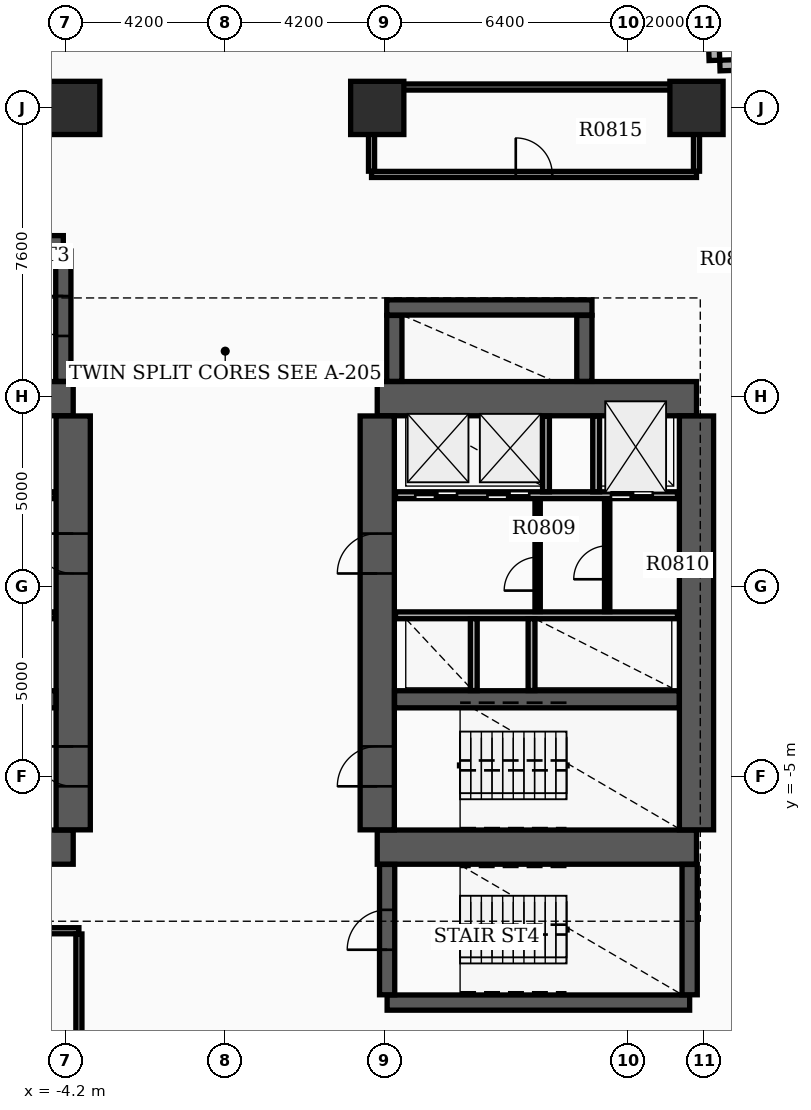
"""IFC4 building model, lengths in metres.
Left out: names, types, materials, properties, quantities, classifications, styles, units other than length and angle.
Written with IfcOpenShell. Run it as: python <this file> out.ifc"""

import sys

from ifc_helpers import new_model, si_unit, direction, frame, frame_2d, origin, origin_2d, place, context, subcontext, project, spatial, rectangle, extrude, element, fill, save


model = new_model("IFC4")
c1 = context("Model", 3, precision=1e-05, world=origin(), true_north=direction((0.0, 1.0)))
c2 = subcontext(c1, "Body", "Model", "MODEL_VIEW")
j1 = project(units=[si_unit("LENGTHUNIT", "METRE"), si_unit("PLANEANGLEUNIT", "RADIAN")], contexts=[c1])
p1 = place(None, origin())
s1 = spatial("IfcSite", under=j1, at=p1, CompositionType="ELEMENT")
p2 = place(p1, origin())
s2 = spatial("IfcBuilding", under=s1, at=p2, CompositionType="ELEMENT")
p3 = place(p2, frame((0.0, 0.0, 56.1)))
s3 = spatial("IfcBuildingStorey", under=s2, at=p3, CompositionType="ELEMENT", Elevation=56.1)
for number, where, z_axis, x_axis in (
    (1, (-12.4, -6.85, 0.0), (0.0, 0.0, 1.0), (1.0, 0.0, 0.0)),
    (2, (-12.4, 4.95, 0.0), (0.0, 0.0, 1.0), (1.0, 0.0, 0.0)),
):
    element("IfcWall", number, at=place(p3, frame(where, z_axis=z_axis, x_axis=x_axis)), inside=s3, PredefinedType="SHEAR", context=c2, shape_type="SweptSolid", body=[
        extrude(rectangle(XDim=8.4, YDim=0.9, at=frame_2d((4.2, 0.0))), origin(), (0.0, 0.0, 1.0), 3.7),
    ])
p4 = place(p3, frame((-4.0, -6.395, 0.0), z_axis=(0.0, 0.0, 1.0), x_axis=(0.0, 1.0, 0.0)))
e3 = element("IfcWall", 3, at=p4, inside=s3, PredefinedType="SHEAR", context=c2, shape_type="SweptSolid", body=[
    extrude(rectangle(XDim=10.89, YDim=0.9, at=frame_2d((5.445, 0.0))), origin(), (0.0, 0.0, 1.0), 3.7),
])
p5 = place(p4, frame((1.145, 0.0, 0.0)))
e4 = element("IfcOpeningElement", 4, at=p5, cuts=e3, PredefinedType="OPENING", context=c2, shape_type="SweptSolid", body=[
    extrude(rectangle(XDim=1.05, YDim=2.15, at=frame_2d((0.525, 1.075))), frame((0.0, 0.46, 0.0), z_axis=(0.0, -1.0, 0.0), x_axis=(1.0, 0.0, 0.0)), (0.0, 0.0, 1.0), 0.92),
])
p6 = place(p4, frame((6.745, 0.0, 0.0)))
e5 = element("IfcOpeningElement", 5, at=p6, cuts=e3, PredefinedType="OPENING", context=c2, shape_type="SweptSolid", body=[
    extrude(rectangle(XDim=1.05, YDim=2.15, at=frame_2d((0.525, 1.075))), frame((0.0, 0.46, 0.0), z_axis=(0.0, -1.0, 0.0), x_axis=(1.0, 0.0, 0.0)), (0.0, 0.0, 1.0), 0.92),
])
p7 = place(p3, frame((-11.945, -2.96, 0.0), z_axis=(0.0, 0.0, 1.0), x_axis=(1.0, 0.0, 0.0)))
e6 = element("IfcWall", 6, at=p7, inside=s3, PredefinedType="SHEAR", context=c2, shape_type="SweptSolid", body=[
    extrude(rectangle(XDim=7.49, YDim=0.45, at=frame_2d((3.745, 0.0))), origin(), (0.0, 0.0, 1.0), 3.7),
])
for number, where, z_axis, x_axis in (
    (7, (4.0, -6.85, 0.0), (0.0, 0.0, 1.0), (1.0, 0.0, 0.0)),
    (8, (4.0, 4.95, 0.0), (0.0, 0.0, 1.0), (1.0, 0.0, 0.0)),
):
    element("IfcWall", number, at=place(p3, frame(where, z_axis=z_axis, x_axis=x_axis)), inside=s3, PredefinedType="SHEAR", context=c2, shape_type="SweptSolid", body=[
        extrude(rectangle(XDim=8.4, YDim=0.9, at=frame_2d((4.2, 0.0))), origin(), (0.0, 0.0, 1.0), 3.7),
    ])
p8 = place(p3, frame((4.0, -6.395, 0.0), z_axis=(0.0, 0.0, 1.0), x_axis=(0.0, 1.0, 0.0)))
e9 = element("IfcWall", 9, at=p8, inside=s3, PredefinedType="SHEAR", context=c2, shape_type="SweptSolid", body=[
    extrude(rectangle(XDim=10.89, YDim=0.9, at=frame_2d((5.445, 0.0))), origin(), (0.0, 0.0, 1.0), 3.7),
])
p9 = place(p8, frame((1.145, 0.0, 0.0)))
e10 = element("IfcOpeningElement", 10, at=p9, cuts=e9, PredefinedType="OPENING", context=c2, shape_type="SweptSolid", body=[
    extrude(rectangle(XDim=1.05, YDim=2.15, at=frame_2d((0.525, 1.075))), frame((0.0, 0.46, 0.0), z_axis=(0.0, -1.0, 0.0), x_axis=(1.0, 0.0, 0.0)), (0.0, 0.0, 1.0), 0.92),
])
p10 = place(p8, frame((6.745, 0.0, 0.0)))
e11 = element("IfcOpeningElement", 11, at=p10, cuts=e9, PredefinedType="OPENING", context=c2, shape_type="SweptSolid", body=[
    extrude(rectangle(XDim=1.05, YDim=2.15, at=frame_2d((0.525, 1.075))), frame((0.0, 0.46, 0.0), z_axis=(0.0, -1.0, 0.0), x_axis=(1.0, 0.0, 0.0)), (0.0, 0.0, 1.0), 0.92),
])
p11 = place(p3, frame((12.4, -6.395, 0.0), z_axis=(0.0, 0.0, 1.0), x_axis=(0.0, 1.0, 0.0)))
e12 = element("IfcWall", 12, at=p11, inside=s3, PredefinedType="SHEAR", context=c2, shape_type="SweptSolid", body=[
    extrude(rectangle(XDim=10.89, YDim=0.9, at=frame_2d((5.445, 0.0))), origin(), (0.0, 0.0, 1.0), 3.7),
])
p12 = place(p3, frame((4.455, -2.96, 0.0), z_axis=(0.0, 0.0, 1.0), x_axis=(1.0, 0.0, 0.0)))
e13 = element("IfcWall", 13, at=p12, inside=s3, PredefinedType="SHEAR", context=c2, shape_type="SweptSolid", body=[
    extrude(rectangle(XDim=7.49, YDim=0.45, at=frame_2d((3.745, 0.0))), origin(), (0.0, 0.0, 1.0), 3.7),
])
p13 = place(p3, frame((-12.22, 9.04, 0.0), z_axis=(0.0, 0.0, 1.0), x_axis=(1.0, 0.0, 0.0)))
e14 = element("IfcWall", 14, at=p13, inside=s3, PredefinedType="SHEAR", context=c2, shape_type="SweptSolid", body=[
    extrude(rectangle(XDim=7.96, YDim=0.4, at=frame_2d((3.98, 0.0))), origin(), (0.0, 0.0, 1.0), 3.7),
])
p14 = place(p3, frame((-4.26, 5.405, 0.0), z_axis=(0.0, 0.0, 1.0), x_axis=(0.0, 1.0, 0.0)))
e15 = element("IfcWall", 15, at=p14, inside=s3, PredefinedType="SHEAR", context=c2, shape_type="SweptSolid", body=[
    extrude(rectangle(XDim=3.43, YDim=0.4, at=frame_2d((1.715, 0.0))), origin(), (0.0, 0.0, 1.0), 3.7),
])
p15 = place(p14, frame((1.195, 0.0, 0.0)))
e16 = element("IfcOpeningElement", 16, at=p15, cuts=e15, PredefinedType="OPENING", context=c2, shape_type="SweptSolid", body=[
    extrude(rectangle(XDim=1.05, YDim=2.15, at=frame_2d((0.525, 1.075))), frame((0.0, 0.21, 0.0), z_axis=(0.0, -1.0, 0.0), x_axis=(1.0, 0.0, 0.0)), (0.0, 0.0, 1.0), 0.42),
])
p16 = place(p3, frame((4.26, -10.94, 0.0), z_axis=(0.0, 0.0, 1.0), x_axis=(1.0, 0.0, 0.0)))
e17 = element("IfcWall", 17, at=p16, inside=s3, PredefinedType="SHEAR", context=c2, shape_type="SweptSolid", body=[
    extrude(rectangle(XDim=7.96, YDim=0.4, at=frame_2d((3.98, 0.0))), origin(), (0.0, 0.0, 1.0), 3.7),
])
p17 = place(p3, frame((4.26, -10.735, 0.0), z_axis=(0.0, 0.0, 1.0), x_axis=(0.0, 1.0, 0.0)))
e18 = element("IfcWall", 18, at=p17, inside=s3, PredefinedType="SHEAR", context=c2, shape_type="SweptSolid", body=[
    extrude(rectangle(XDim=3.43, YDim=0.4, at=frame_2d((1.715, 0.0))), origin(), (0.0, 0.0, 1.0), 3.7),
])
p18 = place(p17, frame((1.185, 0.0, 0.0)))
e19 = element("IfcOpeningElement", 19, at=p18, cuts=e18, PredefinedType="OPENING", context=c2, shape_type="SweptSolid", body=[
    extrude(rectangle(XDim=1.05, YDim=2.15, at=frame_2d((0.525, 1.075))), frame((0.0, 0.21, 0.0), z_axis=(0.0, -1.0, 0.0), x_axis=(1.0, 0.0, 0.0)), (0.0, 0.0, 1.0), 0.42),
])
p19 = place(p3, frame((12.22, -10.735, 0.0), z_axis=(0.0, 0.0, 1.0), x_axis=(0.0, 1.0, 0.0)))
e20 = element("IfcWall", 20, at=p19, inside=s3, PredefinedType="SHEAR", context=c2, shape_type="SweptSolid", body=[
    extrude(rectangle(XDim=3.43, YDim=0.4, at=frame_2d((1.715, 0.0))), origin(), (0.0, 0.0, 1.0), 3.7),
])
p20 = place(p3, frame((4.45, 5.405, 0.0), z_axis=(0.0, 0.0, 1.0), x_axis=(0.0, 1.0, 0.0)))
e21 = element("IfcWall", 21, at=p20, inside=s3, PredefinedType="SHEAR", context=c2, shape_type="SweptSolid", body=[
    extrude(rectangle(XDim=1.735, YDim=0.4, at=frame_2d((0.867, 0.0))), origin(), (0.0, 0.0, 1.0), 3.7),
])
p21 = place(p3, frame((4.25, 7.35, 0.0), z_axis=(0.0, 0.0, 1.0), x_axis=(1.0, 0.0, 0.0)))
e22 = element("IfcWall", 22, at=p21, inside=s3, PredefinedType="SHEAR", context=c2, shape_type="SweptSolid", body=[
    extrude(rectangle(XDim=5.4, YDim=0.4, at=frame_2d((2.7, 0.0))), origin(), (0.0, 0.0, 1.0), 3.7),
])
p22 = place(p3, frame((9.45, 5.405, 0.0), z_axis=(0.0, 0.0, 1.0), x_axis=(0.0, 1.0, 0.0)))
e23 = element("IfcWall", 23, at=p22, inside=s3, PredefinedType="SHEAR", context=c2, shape_type="SweptSolid", body=[
    extrude(rectangle(XDim=1.735, YDim=0.4, at=frame_2d((0.867, 0.0))), origin(), (0.0, 0.0, 1.0), 3.7),
])
for number, where, z_axis, x_axis in (
    (24, (12.4, 12.6, 0.0), (0.0, 0.0, 1.0), (1.0, 0.0, 0.0)),
    (25, (4.0, 12.6, 0.0), (0.0, 0.0, 1.0), (1.0, 0.0, 0.0)),
    (26, (-4.0, 12.6, 0.0), (0.0, 0.0, 1.0), (1.0, 0.0, 0.0)),
):
    element("IfcColumn", number, at=place(p3, frame(where, z_axis=z_axis, x_axis=x_axis)), inside=s3, PredefinedType="COLUMN", context=c2, shape_type="SweptSolid", body=[
        extrude(rectangle(XDim=1.4, YDim=1.4, at=origin_2d()), origin(), (0.0, 0.0, 1.0), 3.9),
    ])
p23 = place(p3, frame((14.235, 13.754, 0.0), z_axis=(0.0, 0.0, 1.0), x_axis=(-0.999506398264, -0.031415916822, 0.0)))
e27 = element("IfcWall", 27, at=p23, inside=s3, PredefinedType="STANDARD", context=c2, shape_type="SweptSolid", body=[
    extrude(rectangle(XDim=1.22, YDim=0.28, at=frame_2d((0.61, 0.0))), origin(), (0.0, 0.0, 1.0), 2.91),
])
p24 = place(p3, frame((12.871, 13.851, 0.0), z_axis=(0.0, 0.0, 1.0), x_axis=(-0.031412596484, 0.999506502621, 0.0)))
e28 = element("IfcWall", 28, at=p24, inside=s3, PredefinedType="STANDARD", context=c2, shape_type="SweptSolid", body=[
    extrude(rectangle(XDim=1.5, YDim=0.28, at=frame_2d((0.75, 0.0))), origin(), (0.0, 0.0, 1.0), 2.91),
])
p25 = place(p3, frame((-11.9, 2.41, 0.0), z_axis=(0.0, 0.0, 1.0), x_axis=(1.0, 0.0, 0.0)))
e29 = element("IfcWall", 29, at=p25, inside=s3, PredefinedType="SOLIDWALL", context=c2, shape_type="SweptSolid", body=[
    extrude(rectangle(XDim=7.42, YDim=0.18, at=frame_2d((3.71, 0.0))), origin(), (0.0, 0.0, 1.0), 2.9),
])
p26 = place(p25, frame((0.55, 0.0, 0.0)))
e30 = element("IfcOpeningElement", 30, at=p26, cuts=e29, PredefinedType="OPENING", context=c2, shape_type="SweptSolid", body=[
    extrude(rectangle(XDim=1.1, YDim=2.15, at=frame_2d((0.55, 1.075))), frame((0.0, 0.1, 0.0), z_axis=(0.0, -1.0, 0.0), x_axis=(1.0, 0.0, 0.0)), (0.0, 0.0, 1.0), 0.2),
])
p27 = place(p25, frame((3.85, 0.0, 0.0)))
e31 = element("IfcOpeningElement", 31, at=p27, cuts=e29, PredefinedType="OPENING", context=c2, shape_type="SweptSolid", body=[
    extrude(rectangle(XDim=1.1, YDim=2.15, at=frame_2d((0.55, 1.075))), frame((0.0, 0.1, 0.0), z_axis=(0.0, -1.0, 0.0), x_axis=(1.0, 0.0, 0.0)), (0.0, 0.0, 1.0), 0.2),
])
p28 = place(p25, frame((5.75, 0.0, 0.0)))
e32 = element("IfcOpeningElement", 32, at=p28, cuts=e29, PredefinedType="OPENING", context=c2, shape_type="SweptSolid", body=[
    extrude(rectangle(XDim=1.1, YDim=2.15, at=frame_2d((0.55, 1.075))), frame((0.0, 0.1, 0.0), z_axis=(0.0, -1.0, 0.0), x_axis=(1.0, 0.0, 0.0)), (0.0, 0.0, 1.0), 0.2),
])
p29 = place(p3, frame((4.48, 2.41, 0.0), z_axis=(0.0, 0.0, 1.0), x_axis=(1.0, 0.0, 0.0)))
e33 = element("IfcWall", 33, at=p29, inside=s3, PredefinedType="SOLIDWALL", context=c2, shape_type="SweptSolid", body=[
    extrude(rectangle(XDim=7.42, YDim=0.18, at=frame_2d((3.71, 0.0))), origin(), (0.0, 0.0, 1.0), 2.9),
])
p30 = place(p29, frame((5.67, 0.0, 0.0)))
e34 = element("IfcOpeningElement", 34, at=p30, cuts=e33, PredefinedType="OPENING", context=c2, shape_type="SweptSolid", body=[
    extrude(rectangle(XDim=1.1, YDim=2.15, at=frame_2d((0.55, 1.075))), frame((0.0, 0.1, 0.0), z_axis=(0.0, -1.0, 0.0), x_axis=(1.0, 0.0, 0.0)), (0.0, 0.0, 1.0), 0.2),
])
p31 = place(p29, frame((0.52, 0.0, 0.0)))
e35 = element("IfcOpeningElement", 35, at=p31, cuts=e33, PredefinedType="OPENING", context=c2, shape_type="SweptSolid", body=[
    extrude(rectangle(XDim=1.1, YDim=2.15, at=frame_2d((0.55, 1.075))), frame((0.0, 0.1, 0.0), z_axis=(0.0, -1.0, 0.0), x_axis=(1.0, 0.0, 0.0)), (0.0, 0.0, 1.0), 0.2),
])
p32 = place(p29, frame((2.42, 0.0, 0.0)))
e36 = element("IfcOpeningElement", 36, at=p32, cuts=e33, PredefinedType="OPENING", context=c2, shape_type="SweptSolid", body=[
    extrude(rectangle(XDim=1.1, YDim=2.15, at=frame_2d((0.55, 1.075))), frame((0.0, 0.1, 0.0), z_axis=(0.0, -1.0, 0.0), x_axis=(1.0, 0.0, 0.0)), (0.0, 0.0, 1.0), 0.2),
])
for number, where, z_axis, x_axis in (
    (37, (-11.9, -0.75, 0.0), (0.0, 0.0, 1.0), (1.0, 0.0, 0.0)),
    (38, (4.48, -0.75, 0.0), (0.0, 0.0, 1.0), (1.0, 0.0, 0.0)),
):
    element("IfcWall", number, at=place(p3, frame(where, z_axis=z_axis, x_axis=x_axis)), inside=s3, PredefinedType="SOLIDWALL", context=c2, shape_type="SweptSolid", body=[
        extrude(rectangle(XDim=7.42, YDim=0.18, at=frame_2d((3.71, 0.0))), origin(), (0.0, 0.0, 1.0), 2.9),
    ])
for number, where, z_axis, x_axis in (
    (39, (8.44, 2.5, 0.0), (0.0, 0.0, 1.0), (0.0, 1.0, 0.0)),
    (40, (9.76, 2.5, 0.0), (0.0, 0.0, 1.0), (0.0, 1.0, 0.0)),
):
    element("IfcWall", number, at=place(p3, frame(where, z_axis=z_axis, x_axis=x_axis)), inside=s3, PredefinedType="SOLIDWALL", context=c2, shape_type="SweptSolid", body=[
        extrude(rectangle(XDim=1.99, YDim=0.18, at=frame_2d((0.995, 0.0))), origin(), (0.0, 0.0, 1.0), 2.9),
    ])
for number, where, z_axis, x_axis in (
    (41, (6.54, -2.73, 0.0), (0.0, 0.0, 1.0), (0.0, 1.0, 0.0)),
    (42, (8.06, -2.73, 0.0), (0.0, 0.0, 1.0), (0.0, 1.0, 0.0)),
):
    element("IfcWall", number, at=place(p3, frame(where, z_axis=z_axis, x_axis=x_axis)), inside=s3, PredefinedType="SOLIDWALL", context=c2, shape_type="SweptSolid", body=[
        extrude(rectangle(XDim=1.89, YDim=0.18, at=frame_2d((0.945, 0.0))), origin(), (0.0, 0.0, 1.0), 2.9),
    ])
p33 = place(p3, frame((8.22, -0.65, 0.0), z_axis=(0.0, 0.0, 1.0), x_axis=(0.0, 1.0, 0.0)))
e43 = element("IfcWall", 43, at=p33, inside=s3, PredefinedType="SOLIDWALL", context=c2, shape_type="SweptSolid", body=[
    extrude(rectangle(XDim=2.96, YDim=0.14, at=frame_2d((1.48, 0.0))), origin(), (0.0, 0.0, 1.0), 2.9),
])
p34 = place(p33, frame((0.55, 0.0, 0.0)))
e44 = element("IfcOpeningElement", 44, at=p34, cuts=e43, PredefinedType="OPENING", context=c2, shape_type="SweptSolid", body=[
    extrude(rectangle(XDim=0.88, YDim=2.1, at=frame_2d((0.44, 1.05))), frame((0.0, 0.08, 0.0), z_axis=(0.0, -1.0, 0.0), x_axis=(1.0, 0.0, 0.0)), (0.0, 0.0, 1.0), 0.16),
])
p35 = place(p3, frame((10.05, -0.652, 0.0), z_axis=(0.0, 0.0, 1.0), x_axis=(0.0, 1.0, 0.0)))
e45 = element("IfcWall", 45, at=p35, inside=s3, PredefinedType="PARTITIONING", context=c2, shape_type="SweptSolid", body=[
    extrude(rectangle(XDim=2.962, YDim=0.14, at=frame_2d((1.481, 0.0))), origin(), (0.0, 0.0, 1.0), 2.9),
])
p36 = place(p35, frame((0.85, 0.0, 0.0)))
e46 = element("IfcOpeningElement", 46, at=p36, cuts=e45, PredefinedType="OPENING", context=c2, shape_type="SweptSolid", body=[
    extrude(rectangle(XDim=0.88, YDim=2.1, at=frame_2d((0.44, 1.05))), frame((0.0, 0.08, 0.0), z_axis=(0.0, -1.0, 0.0), x_axis=(1.0, 0.0, 0.0)), (0.0, 0.0, 1.0), 0.16),
])
p37 = place(p3, frame((3.85, 10.85, 0.0), z_axis=(0.0, 0.0, 1.0), x_axis=(1.0, 0.0, 0.0)))
e47 = element("IfcWall", 47, at=p37, inside=s3, PredefinedType="PARTITIONING", context=c2, shape_type="SweptSolid", body=[
    extrude(rectangle(XDim=8.55, YDim=0.16, at=frame_2d((4.275, 0.0))), origin(), (0.0, 0.0, 1.0), 2.9),
])
p38 = place(p37, frame((3.795, 0.0, 0.0)))
e48 = element("IfcOpeningElement", 48, at=p38, cuts=e47, PredefinedType="OPENING", context=c2, shape_type="SweptSolid", body=[
    extrude(rectangle(XDim=0.96, YDim=2.15, at=frame_2d((0.48, 1.075))), frame((0.0, 0.09, 0.0), z_axis=(0.0, -1.0, 0.0), x_axis=(1.0, 0.0, 0.0)), (0.0, 0.0, 1.0), 0.18),
])
p39 = place(p3, frame((3.85, 13.15, 0.0), z_axis=(0.0, 0.0, 1.0), x_axis=(1.0, 0.0, 0.0)))
e49 = element("IfcWall", 49, at=p39, inside=s3, PredefinedType="PARTITIONING", context=c2, shape_type="SweptSolid", body=[
    extrude(rectangle(XDim=8.55, YDim=0.16, at=frame_2d((4.275, 0.0))), origin(), (0.0, 0.0, 1.0), 2.9),
])
for number, where, z_axis, x_axis in (
    (50, (3.85, 10.935, 0.0), (0.0, 0.0, 1.0), (0.0, 1.0, 0.0)),
    (51, (12.4, 10.935, 0.0), (0.0, 0.0, 1.0), (0.0, 1.0, 0.0)),
):
    element("IfcWall", number, at=place(p3, frame(where, z_axis=z_axis, x_axis=x_axis)), inside=s3, PredefinedType="PARTITIONING", context=c2, shape_type="SweptSolid", body=[
        extrude(rectangle(XDim=2.13, YDim=0.16, at=frame_2d((1.065, 0.0))), origin(), (0.0, 0.0, 1.0), 2.9),
    ])
p40 = place(p3, frame((-12.4, -9.05, 0.0), z_axis=(0.0, 0.0, 1.0), x_axis=(1.0, 0.0, 0.0)))
e52 = element("IfcWall", 52, at=p40, inside=s3, PredefinedType="PARTITIONING", context=c2, shape_type="SweptSolid", body=[
    extrude(rectangle(XDim=8.55, YDim=0.16, at=frame_2d((4.275, 0.0))), origin(), (0.0, 0.0, 1.0), 2.9),
])
p41 = place(p40, frame((3.795, 0.0, 0.0)))
e53 = element("IfcOpeningElement", 53, at=p41, cuts=e52, PredefinedType="OPENING", context=c2, shape_type="SweptSolid", body=[
    extrude(rectangle(XDim=0.96, YDim=2.15, at=frame_2d((0.48, 1.075))), frame((0.0, 0.09, 0.0), z_axis=(0.0, -1.0, 0.0), x_axis=(1.0, 0.0, 0.0)), (0.0, 0.0, 1.0), 0.18),
])
p42 = place(p3, frame((-3.85, -13.065, 0.0), z_axis=(0.0, 0.0, 1.0), x_axis=(0.0, 1.0, 0.0)))
e54 = element("IfcWall", 54, at=p42, inside=s3, PredefinedType="PARTITIONING", context=c2, shape_type="SweptSolid", body=[
    extrude(rectangle(XDim=3.93, YDim=0.16, at=frame_2d((1.965, 0.0))), origin(), (0.0, 0.0, 1.0), 2.9),
])
p43 = place(p5, origin())
e55 = element("IfcDoor", 55, at=p43, inside=s3, OperationType="SINGLE_SWING_RIGHT", PredefinedType="DOOR", context=c2, shape_type="SweptSolid", body=[
    extrude(rectangle(XDim=1.05, YDim=2.15, at=frame_2d((0.525, 1.075))), frame((0.0, 0.025, 0.0), z_axis=(0.0, -1.0, 0.0), x_axis=(1.0, 0.0, 0.0)), (0.0, 0.0, 1.0), 0.05),
])
fill(e4, e55)
p44 = place(p9, origin())
e56 = element("IfcDoor", 56, at=p44, inside=s3, OperationType="SINGLE_SWING_LEFT", PredefinedType="DOOR", context=c2, shape_type="SweptSolid", body=[
    extrude(rectangle(XDim=1.05, YDim=2.15, at=frame_2d((0.525, 1.075))), frame((0.0, 0.025, 0.0), z_axis=(0.0, -1.0, 0.0), x_axis=(1.0, 0.0, 0.0)), (0.0, 0.0, 1.0), 0.05),
])
fill(e10, e56)
p45 = place(p6, origin())
e57 = element("IfcDoor", 57, at=p45, inside=s3, OperationType="SINGLE_SWING_RIGHT", PredefinedType="DOOR", context=c2, shape_type="SweptSolid", body=[
    extrude(rectangle(XDim=1.05, YDim=2.15, at=frame_2d((0.525, 1.075))), frame((0.0, 0.025, 0.0), z_axis=(0.0, -1.0, 0.0), x_axis=(1.0, 0.0, 0.0)), (0.0, 0.0, 1.0), 0.05),
])
fill(e5, e57)
p46 = place(p10, origin())
e58 = element("IfcDoor", 58, at=p46, inside=s3, OperationType="SINGLE_SWING_LEFT", PredefinedType="DOOR", context=c2, shape_type="SweptSolid", body=[
    extrude(rectangle(XDim=1.05, YDim=2.15, at=frame_2d((0.525, 1.075))), frame((0.0, 0.025, 0.0), z_axis=(0.0, -1.0, 0.0), x_axis=(1.0, 0.0, 0.0)), (0.0, 0.0, 1.0), 0.05),
])
fill(e11, e58)
p47 = place(p15, origin())
e59 = element("IfcDoor", 59, at=p47, inside=s3, OperationType="SINGLE_SWING_RIGHT", PredefinedType="DOOR", context=c2, shape_type="SweptSolid", body=[
    extrude(rectangle(XDim=1.05, YDim=2.15, at=frame_2d((0.525, 1.075))), frame((0.0, 0.025, 0.0), z_axis=(0.0, -1.0, 0.0), x_axis=(1.0, 0.0, 0.0)), (0.0, 0.0, 1.0), 0.05),
])
fill(e16, e59)
p48 = place(p18, origin())
e60 = element("IfcDoor", 60, at=p48, inside=s3, OperationType="SINGLE_SWING_LEFT", PredefinedType="DOOR", context=c2, shape_type="SweptSolid", body=[
    extrude(rectangle(XDim=1.05, YDim=2.15, at=frame_2d((0.525, 1.075))), frame((0.0, 0.025, 0.0), z_axis=(0.0, -1.0, 0.0), x_axis=(1.0, 0.0, 0.0)), (0.0, 0.0, 1.0), 0.05),
])
fill(e19, e60)
p49 = place(p30, origin())
e61 = element("IfcDoor", 61, at=p49, inside=s3, OperationType="DOUBLE_DOOR_SLIDING", PredefinedType="DOOR", context=c2, shape_type="SweptSolid", body=[
    extrude(rectangle(XDim=1.1, YDim=2.15, at=frame_2d((0.55, 1.075))), frame((0.0, 0.025, 0.0), z_axis=(0.0, -1.0, 0.0), x_axis=(1.0, 0.0, 0.0)), (0.0, 0.0, 1.0), 0.05),
])
fill(e34, e61)
p50 = place(p31, origin())
e62 = element("IfcDoor", 62, at=p50, inside=s3, OperationType="DOUBLE_DOOR_SLIDING", PredefinedType="DOOR", context=c2, shape_type="SweptSolid", body=[
    extrude(rectangle(XDim=1.1, YDim=2.15, at=frame_2d((0.55, 1.075))), frame((0.0, 0.025, 0.0), z_axis=(0.0, -1.0, 0.0), x_axis=(1.0, 0.0, 0.0)), (0.0, 0.0, 1.0), 0.05),
])
fill(e35, e62)
p51 = place(p32, origin())
e63 = element("IfcDoor", 63, at=p51, inside=s3, OperationType="DOUBLE_DOOR_SLIDING", PredefinedType="DOOR", context=c2, shape_type="SweptSolid", body=[
    extrude(rectangle(XDim=1.1, YDim=2.15, at=frame_2d((0.55, 1.075))), frame((0.0, 0.025, 0.0), z_axis=(0.0, -1.0, 0.0), x_axis=(1.0, 0.0, 0.0)), (0.0, 0.0, 1.0), 0.05),
])
fill(e36, e63)
p52 = place(p34, origin())
e64 = element("IfcDoor", 64, at=p52, inside=s3, OperationType="SINGLE_SWING_LEFT", PredefinedType="DOOR", context=c2, shape_type="SweptSolid", body=[
    extrude(rectangle(XDim=0.88, YDim=2.1, at=frame_2d((0.44, 1.05))), frame((0.0, 0.025, 0.0), z_axis=(0.0, -1.0, 0.0), x_axis=(1.0, 0.0, 0.0)), (0.0, 0.0, 1.0), 0.05),
])
fill(e44, e64)
p53 = place(p36, origin())
e65 = element("IfcDoor", 65, at=p53, inside=s3, OperationType="SINGLE_SWING_LEFT", PredefinedType="DOOR", context=c2, shape_type="SweptSolid", body=[
    extrude(rectangle(XDim=0.88, YDim=2.1, at=frame_2d((0.44, 1.05))), frame((0.0, 0.025, 0.0), z_axis=(0.0, -1.0, 0.0), x_axis=(1.0, 0.0, 0.0)), (0.0, 0.0, 1.0), 0.05),
])
fill(e46, e65)
p54 = place(p38, origin())
e66 = element("IfcDoor", 66, at=p54, inside=s3, OperationType="SINGLE_SWING_LEFT", PredefinedType="DOOR", context=c2, shape_type="SweptSolid", body=[
    extrude(rectangle(XDim=0.96, YDim=2.15, at=frame_2d((0.48, 1.075))), frame((0.0, 0.025, 0.0), z_axis=(0.0, -1.0, 0.0), x_axis=(1.0, 0.0, 0.0)), (0.0, 0.0, 1.0), 0.05),
])
fill(e48, e66)
save(model, sys.argv[1])
